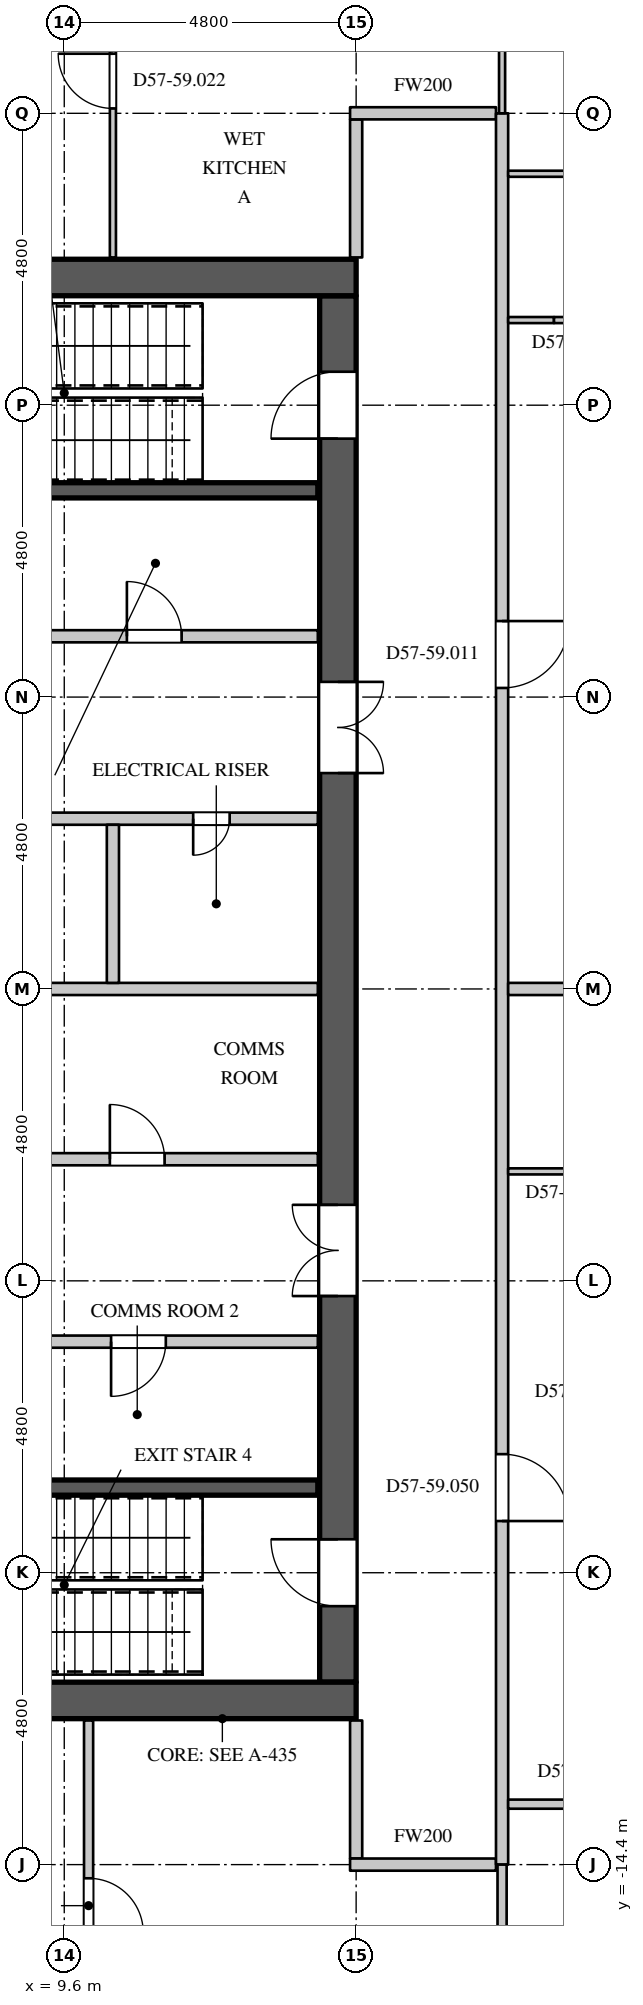
"""IFC4 building model, lengths in metres.
Left out: names, types, materials, properties, quantities, classifications, styles, units other than length and angle.
Written with IfcOpenShell. Run it as: python <this file> out.ifc"""

import sys

from ifc_helpers import new_model, si_unit, direction, frame, frame_2d, origin, place, context, subcontext, project, spatial, rectangle, extrude, element, fill, save


model = new_model("IFC4")
c1 = context("Model", 3, precision=1e-05, world=origin(), true_north=direction((0.0, 1.0)))
c2 = subcontext(c1, "Body", "Model", "MODEL_VIEW")
j1 = project(units=[si_unit("LENGTHUNIT", "METRE"), si_unit("PLANEANGLEUNIT", "RADIAN")], contexts=[c1])
p1 = place(None, origin())
s1 = spatial("IfcSite", under=j1, at=p1, CompositionType="ELEMENT")
p2 = place(p1, origin())
s2 = spatial("IfcBuilding", under=s1, at=p2, CompositionType="ELEMENT")
p3 = place(p2, frame((0.0, 0.0, 247.5)))
s3 = spatial("IfcBuildingStorey", under=s2, at=p3, CompositionType="ELEMENT", Elevation=247.5)
for number, where, z_axis, x_axis in (
    (1, (-14.4, 11.7, 0.0), (0.0, 0.0, 1.0), (1.0, 0.0, 0.0)),
    (2, (-14.4, -11.7, 0.0), (0.0, 0.0, 1.0), (1.0, 0.0, 0.0)),
):
    element("IfcWall", number, at=place(p3, frame(where, z_axis=z_axis, x_axis=x_axis)), inside=s3, PredefinedType="SHEAR", context=c2, shape_type="SweptSolid", body=[
        extrude(rectangle(XDim=28.8, YDim=0.6, at=frame_2d((14.4, 0.0))), origin(), (0.0, 0.0, 1.0), 4.2),
    ])
p4 = place(p3, frame((14.1, -11.4, 0.0), z_axis=(0.0, 0.0, 1.0), x_axis=(0.0, 1.0, 0.0)))
e3 = element("IfcWall", 3, at=p4, inside=s3, PredefinedType="SHEAR", context=c2, shape_type="SweptSolid", body=[
    extrude(rectangle(XDim=22.8, YDim=0.6, at=frame_2d((11.4, 0.0))), origin(), (0.0, 0.0, 1.0), 4.2),
])
p5 = place(p4, frame((20.45, 0.0, 0.0)))
e4 = element("IfcOpeningElement", 4, at=p5, cuts=e3, PredefinedType="OPENING", context=c2, shape_type="SweptSolid", body=[
    extrude(rectangle(XDim=1.1, YDim=2.2, at=frame_2d((0.55, 1.1))), frame((0.0, 0.31, 0.0), z_axis=(0.0, -1.0, 0.0), x_axis=(1.0, 0.0, 0.0)), (0.0, 0.0, 1.0), 0.62),
])
p6 = place(p4, frame((1.25, 0.0, 0.0)))
e5 = element("IfcOpeningElement", 5, at=p6, cuts=e3, PredefinedType="OPENING", context=c2, shape_type="SweptSolid", body=[
    extrude(rectangle(XDim=1.1, YDim=2.2, at=frame_2d((0.55, 1.1))), frame((0.0, 0.31, 0.0), z_axis=(0.0, -1.0, 0.0), x_axis=(1.0, 0.0, 0.0)), (0.0, 0.0, 1.0), 0.62),
])
p7 = place(p4, frame((14.95, 0.0, 0.0)))
e6 = element("IfcOpeningElement", 6, at=p7, cuts=e3, PredefinedType="OPENING", context=c2, shape_type="SweptSolid", body=[
    extrude(rectangle(XDim=1.5, YDim=2.4, at=frame_2d((0.75, 1.2))), frame((0.0, 0.31, 0.0), z_axis=(0.0, -1.0, 0.0), x_axis=(1.0, 0.0, 0.0)), (0.0, 0.0, 1.0), 0.62),
])
p8 = place(p4, frame((6.35, 0.0, 0.0)))
e7 = element("IfcOpeningElement", 7, at=p8, cuts=e3, PredefinedType="OPENING", context=c2, shape_type="SweptSolid", body=[
    extrude(rectangle(XDim=1.5, YDim=2.4, at=frame_2d((0.75, 1.2))), frame((0.0, 0.31, 0.0), z_axis=(0.0, -1.0, 0.0), x_axis=(1.0, 0.0, 0.0)), (0.0, 0.0, 1.0), 0.62),
])
p9 = place(p3, frame((8.38, 5.8, 0.0), z_axis=(0.0, 0.0, 1.0), x_axis=(1.0, 0.0, 0.0)))
e8 = element("IfcWall", 8, at=p9, inside=s3, PredefinedType="PARTITIONING", context=c2, shape_type="SweptSolid", body=[
    extrude(rectangle(XDim=5.39, YDim=0.2, at=frame_2d((2.695, 0.0))), origin(), (0.0, 0.0, 1.0), 3.95),
])
p10 = place(p9, frame((2.25, 0.0, 0.0)))
e9 = element("IfcOpeningElement", 9, at=p10, cuts=e8, PredefinedType="OPENING", context=c2, shape_type="SweptSolid", body=[
    extrude(rectangle(XDim=0.9, YDim=2.2, at=frame_2d((0.45, 1.1))), frame((0.0, 0.11, 0.0), z_axis=(0.0, -1.0, 0.0), x_axis=(1.0, 0.0, 0.0)), (0.0, 0.0, 1.0), 0.22),
])
p11 = place(p3, frame((14.4, -14.3, 0.0), z_axis=(0.0, 0.0, 1.0), x_axis=(0.0, 1.0, 0.0)))
e10 = element("IfcWall", 10, at=p11, inside=s3, PredefinedType="PARTITIONING", context=c2, shape_type="SweptSolid", body=[
    extrude(rectangle(XDim=2.27, YDim=0.2, at=frame_2d((1.135, 0.0))), origin(), (0.0, 0.0, 1.0), 3.95),
])
p12 = place(p3, frame((14.3, -14.4, 0.0), z_axis=(0.0, 0.0, 1.0), x_axis=(1.0, 0.0, 0.0)))
e11 = element("IfcWall", 11, at=p12, inside=s3, PredefinedType="PARTITIONING", context=c2, shape_type="SweptSolid", body=[
    extrude(rectangle(XDim=2.4, YDim=0.2, at=frame_2d((1.2, 0.0))), origin(), (0.0, 0.0, 1.0), 3.95),
])
p13 = place(p3, frame((14.4, 12.03, 0.0), z_axis=(0.0, 0.0, 1.0), x_axis=(0.0, 1.0, 0.0)))
e12 = element("IfcWall", 12, at=p13, inside=s3, PredefinedType="PARTITIONING", context=c2, shape_type="SweptSolid", body=[
    extrude(rectangle(XDim=2.27, YDim=0.2, at=frame_2d((1.135, 0.0))), origin(), (0.0, 0.0, 1.0), 3.95),
])
p14 = place(p3, frame((14.3, 14.4, 0.0), z_axis=(0.0, 0.0, 1.0), x_axis=(1.0, 0.0, 0.0)))
e13 = element("IfcWall", 13, at=p14, inside=s3, PredefinedType="PARTITIONING", context=c2, shape_type="SweptSolid", body=[
    extrude(rectangle(XDim=2.4, YDim=0.2, at=frame_2d((1.2, 0.0))), origin(), (0.0, 0.0, 1.0), 3.95),
])
p15 = place(p3, frame((16.8, -14.4, 0.0), z_axis=(0.0, 0.0, 1.0), x_axis=(0.0, 1.0, 0.0)))
e14 = element("IfcWall", 14, at=p15, inside=s3, PredefinedType="PARTITIONING", context=c2, shape_type="SweptSolid", body=[
    extrude(rectangle(XDim=28.8, YDim=0.2, at=frame_2d((14.4, 0.0))), origin(), (0.0, 0.0, 1.0), 3.95),
])
p16 = place(p15, frame((19.35, 0.0, 0.0)))
e15 = element("IfcOpeningElement", 15, at=p16, cuts=e14, PredefinedType="OPENING", context=c2, shape_type="SweptSolid", body=[
    extrude(rectangle(XDim=1.1, YDim=2.4, at=frame_2d((0.55, 1.2))), frame((0.0, 0.11, 0.0), z_axis=(0.0, -1.0, 0.0), x_axis=(1.0, 0.0, 0.0)), (0.0, 0.0, 1.0), 0.22),
])
p17 = place(p15, frame((5.65, 0.0, 0.0)))
e16 = element("IfcOpeningElement", 16, at=p17, cuts=e14, PredefinedType="OPENING", context=c2, shape_type="SweptSolid", body=[
    extrude(rectangle(XDim=1.1, YDim=2.4, at=frame_2d((0.55, 1.2))), frame((0.0, 0.11, 0.0), z_axis=(0.0, -1.0, 0.0), x_axis=(1.0, 0.0, 0.0)), (0.0, 0.0, 1.0), 0.22),
])
p18 = place(p3, frame((10.0, -18.075, 0.0), z_axis=(0.0, 0.0, 1.0), x_axis=(0.0, 1.0, 0.0)))
e17 = element("IfcWall", 17, at=p18, inside=s3, PredefinedType="PARTITIONING", context=c2, shape_type="SweptSolid", body=[
    extrude(rectangle(XDim=6.045, YDim=0.15, at=frame_2d((3.022, 0.0))), origin(), (0.0, 0.0, 1.0), 3.95),
])
p19 = place(p18, frame((2.55, 0.0, 0.0)))
e18 = element("IfcOpeningElement", 18, at=p19, cuts=e17, PredefinedType="OPENING", context=c2, shape_type="SweptSolid", body=[
    extrude(rectangle(XDim=0.9, YDim=2.2, at=frame_2d((0.45, 1.1))), frame((0.0, 0.085, 0.0), z_axis=(0.0, -1.0, 0.0), x_axis=(1.0, 0.0, 0.0)), (0.0, 0.0, 1.0), 0.17),
])
p20 = place(p3, frame((16.8, -19.828, 0.0), z_axis=(0.0, 0.0, 1.0), x_axis=(0.0, 1.0, 0.0)))
e19 = element("IfcWall", 19, at=p20, inside=s3, PredefinedType="PARTITIONING", context=c2, shape_type="SweptSolid", body=[
    extrude(rectangle(XDim=5.428, YDim=0.15, at=frame_2d((2.714, 0.0))), origin(), (0.0, 0.0, 1.0), 3.95),
])
p21 = place(p20, frame((0.4, 0.0, 0.0)))
e20 = element("IfcOpeningElement", 20, at=p21, cuts=e19, PredefinedType="OPENING", context=c2, shape_type="SweptSolid", body=[
    extrude(rectangle(XDim=0.95, YDim=2.2, at=frame_2d((0.475, 1.1))), frame((0.0, 0.085, 0.0), z_axis=(0.0, -1.0, 0.0), x_axis=(1.0, 0.0, 0.0)), (0.0, 0.0, 1.0), 0.17),
])
p22 = place(p3, frame((16.9, -13.406, 0.0), z_axis=(0.0, 0.0, 1.0), x_axis=(1.0, 0.0, 0.0)))
e21 = element("IfcWall", 21, at=p22, inside=s3, PredefinedType="PARTITIONING", context=c2, shape_type="SweptSolid", body=[
    extrude(rectangle(XDim=8.324, YDim=0.15, at=frame_2d((4.162, 0.0))), origin(), (0.0, 0.0, 1.0), 3.95),
])
p23 = place(p22, frame((1.3, 0.0, 0.0)))
e22 = element("IfcOpeningElement", 22, at=p23, cuts=e21, PredefinedType="OPENING", context=c2, shape_type="SweptSolid", body=[
    extrude(rectangle(XDim=0.95, YDim=2.2, at=frame_2d((0.475, 1.1))), frame((0.0, 0.085, 0.0), z_axis=(0.0, -1.0, 0.0), x_axis=(1.0, 0.0, 0.0)), (0.0, 0.0, 1.0), 0.17),
])
p24 = place(p3, frame((16.9, 0.0, 0.0), z_axis=(0.0, 0.0, 1.0), x_axis=(1.0, 0.0, 0.0)))
e23 = element("IfcWall", 23, at=p24, inside=s3, PredefinedType="PARTITIONING", context=c2, shape_type="SweptSolid", body=[
    extrude(rectangle(XDim=9.555, YDim=0.2, at=frame_2d((4.778, 0.0))), origin(), (0.0, 0.0, 1.0), 3.95),
])
p25 = place(p3, frame((3.62, 2.8, 0.0), z_axis=(0.0, 0.0, 1.0), x_axis=(1.0, 0.0, 0.0)))
e24 = element("IfcWall", 24, at=p25, inside=s3, PredefinedType="PARTITIONING", context=c2, shape_type="SweptSolid", body=[
    extrude(rectangle(XDim=10.15, YDim=0.2, at=frame_2d((5.075, 0.0))), origin(), (0.0, 0.0, 1.0), 3.95),
])
p26 = place(p25, frame((8.1, 0.0, 0.0)))
e25 = element("IfcOpeningElement", 25, at=p26, cuts=e24, PredefinedType="OPENING", context=c2, shape_type="SweptSolid", body=[
    extrude(rectangle(XDim=0.6, YDim=2.0, at=frame_2d((0.3, 1.0))), frame((0.0, 0.11, 0.0), z_axis=(0.0, -1.0, 0.0), x_axis=(1.0, 0.0, 0.0)), (0.0, 0.0, 1.0), 0.22),
])
p27 = place(p25, frame((3.0, 0.0, 0.0)))
e26 = element("IfcOpeningElement", 26, at=p27, cuts=e24, PredefinedType="OPENING", context=c2, shape_type="SweptSolid", body=[
    extrude(rectangle(XDim=0.9, YDim=2.2, at=frame_2d((0.45, 1.1))), frame((0.0, 0.11, 0.0), z_axis=(0.0, -1.0, 0.0), x_axis=(1.0, 0.0, 0.0)), (0.0, 0.0, 1.0), 0.22),
])
p28 = place(p3, frame((7.82, -5.8, 0.0), z_axis=(0.0, 0.0, 1.0), x_axis=(1.0, 0.0, 0.0)))
e27 = element("IfcWall", 27, at=p28, inside=s3, PredefinedType="PARTITIONING", context=c2, shape_type="SweptSolid", body=[
    extrude(rectangle(XDim=5.95, YDim=0.2, at=frame_2d((2.975, 0.0))), origin(), (0.0, 0.0, 1.0), 3.95),
])
p29 = place(p28, frame((2.55, 0.0, 0.0)))
e28 = element("IfcOpeningElement", 28, at=p29, cuts=e27, PredefinedType="OPENING", context=c2, shape_type="SweptSolid", body=[
    extrude(rectangle(XDim=0.9, YDim=2.2, at=frame_2d((0.45, 1.1))), frame((0.0, 0.11, 0.0), z_axis=(0.0, -1.0, 0.0), x_axis=(1.0, 0.0, 0.0)), (0.0, 0.0, 1.0), 0.22),
])
p30 = place(p3, frame((7.8, -2.8, 0.0), z_axis=(0.0, 0.0, 1.0), x_axis=(1.0, 0.0, 0.0)))
e29 = element("IfcWall", 29, at=p30, inside=s3, PredefinedType="PARTITIONING", context=c2, shape_type="SweptSolid", body=[
    extrude(rectangle(XDim=5.97, YDim=0.2, at=frame_2d((2.985, 0.0))), origin(), (0.0, 0.0, 1.0), 3.95),
])
p31 = place(p30, frame((2.55, 0.0, 0.0)))
e30 = element("IfcOpeningElement", 30, at=p31, cuts=e29, PredefinedType="OPENING", context=c2, shape_type="SweptSolid", body=[
    extrude(rectangle(XDim=0.9, YDim=2.2, at=frame_2d((0.45, 1.1))), frame((0.0, 0.11, 0.0), z_axis=(0.0, -1.0, 0.0), x_axis=(1.0, 0.0, 0.0)), (0.0, 0.0, 1.0), 0.22),
])
p32 = place(p3, frame((7.8, 0.0, 0.0), z_axis=(0.0, 0.0, 1.0), x_axis=(1.0, 0.0, 0.0)))
e31 = element("IfcWall", 31, at=p32, inside=s3, PredefinedType="PARTITIONING", context=c2, shape_type="SweptSolid", body=[
    extrude(rectangle(XDim=5.97, YDim=0.2, at=frame_2d((2.985, 0.0))), origin(), (0.0, 0.0, 1.0), 3.95),
])
p33 = place(p3, frame((10.4, 0.1, 0.0), z_axis=(0.0, 0.0, 1.0), x_axis=(0.0, 1.0, 0.0)))
e32 = element("IfcWall", 32, at=p33, inside=s3, PredefinedType="PARTITIONING", context=c2, shape_type="SweptSolid", body=[
    extrude(rectangle(XDim=2.6, YDim=0.2, at=frame_2d((1.3, 0.0))), origin(), (0.0, 0.0, 1.0), 3.95),
])
for number, where, z_axis, x_axis in (
    (33, (5.275, -8.2, 0.0), (0.0, 0.0, 1.0), (1.0, 0.0, 0.0)),
    (34, (5.275, 8.2, 0.0), (0.0, 0.0, 1.0), (1.0, 0.0, 0.0)),
):
    element("IfcWall", number, at=place(p3, frame(where, z_axis=z_axis, x_axis=x_axis)), inside=s3, PredefinedType="SHEAR", context=c2, shape_type="SweptSolid", body=[
        extrude(rectangle(XDim=8.495, YDim=0.25, at=frame_2d((4.248, 0.0))), origin(), (0.0, 0.0, 1.0), 3.95),
    ])
p34 = place(p3, frame((10.4, 12.03, 0.0), z_axis=(0.0, 0.0, 1.0), x_axis=(0.0, 1.0, 0.0)))
e35 = element("IfcWall", 35, at=p34, inside=s3, PredefinedType="PARTITIONING", context=c2, shape_type="SweptSolid", body=[
    extrude(rectangle(XDim=5.795, YDim=0.1, at=frame_2d((2.897, 0.0))), origin(), (0.0, 0.0, 1.0), 3.95),
])
p35 = place(p34, frame((2.45, 0.0, 0.0)))
e36 = element("IfcOpeningElement", 36, at=p35, cuts=e35, PredefinedType="OPENING", context=c2, shape_type="SweptSolid", body=[
    extrude(rectangle(XDim=0.9, YDim=2.2, at=frame_2d((0.45, 1.1))), frame((0.0, 0.06, 0.0), z_axis=(0.0, -1.0, 0.0), x_axis=(1.0, 0.0, 0.0)), (0.0, 0.0, 1.0), 0.12),
])
p36 = place(p3, frame((16.9, -3.0, 0.0), z_axis=(0.0, 0.0, 1.0), x_axis=(1.0, 0.0, 0.0)))
e37 = element("IfcWall", 37, at=p36, inside=s3, PredefinedType="PARTITIONING", context=c2, shape_type="SweptSolid", body=[
    extrude(rectangle(XDim=2.875, YDim=0.1, at=frame_2d((1.438, 0.0))), origin(), (0.0, 0.0, 1.0), 3.95),
])
p37 = place(p36, frame((0.95, 0.0, 0.0)))
e38 = element("IfcOpeningElement", 38, at=p37, cuts=e37, PredefinedType="OPENING", context=c2, shape_type="SweptSolid", body=[
    extrude(rectangle(XDim=0.9, YDim=2.2, at=frame_2d((0.45, 1.1))), frame((0.0, 0.06, 0.0), z_axis=(0.0, -1.0, 0.0), x_axis=(1.0, 0.0, 0.0)), (0.0, 0.0, 1.0), 0.12),
])
p38 = place(p3, frame((16.9, 11.0, 0.0), z_axis=(0.0, 0.0, 1.0), x_axis=(1.0, 0.0, 0.0)))
e39 = element("IfcWall", 39, at=p38, inside=s3, PredefinedType="PARTITIONING", context=c2, shape_type="SweptSolid", body=[
    extrude(rectangle(XDim=0.754, YDim=0.1, at=frame_2d((0.377, 0.0))), origin(), (0.0, 0.0, 1.0), 3.35),
])
p39 = place(p3, frame((17.654, 11.0, 0.0), z_axis=(0.0, 0.0, 1.0), x_axis=(1.0, 0.0, 0.0)))
e40 = element("IfcWall", 40, at=p39, inside=s3, PredefinedType="PARTITIONING", context=c2, shape_type="SweptSolid", body=[
    extrude(rectangle(XDim=2.921, YDim=0.1, at=frame_2d((1.46, 0.0))), origin(), (0.0, 0.0, 1.0), 3.95),
])
p40 = place(p39, frame((0.596, 0.0, 0.0)))
e41 = element("IfcOpeningElement", 41, at=p40, cuts=e40, PredefinedType="OPENING", context=c2, shape_type="SweptSolid", body=[
    extrude(rectangle(XDim=0.9, YDim=2.2, at=frame_2d((0.45, 1.1))), frame((0.0, 0.06, 0.0), z_axis=(0.0, -1.0, 0.0), x_axis=(1.0, 0.0, 0.0)), (0.0, 0.0, 1.0), 0.12),
])
p41 = place(p3, frame((16.9, 13.406, 0.0), z_axis=(0.0, 0.0, 1.0), x_axis=(1.0, 0.0, 0.0)))
e42 = element("IfcWall", 42, at=p41, inside=s3, PredefinedType="PARTITIONING", context=c2, shape_type="SweptSolid", body=[
    extrude(rectangle(XDim=3.75, YDim=0.1, at=frame_2d((1.875, 0.0))), origin(), (0.0, 0.0, 1.0), 3.95),
])
p42 = place(p3, frame((16.8, 14.4, 0.0), z_axis=(0.0, 0.0, 1.0), x_axis=(0.0, 1.0, 0.0)))
e43 = element("IfcWall", 43, at=p42, inside=s3, PredefinedType="PARTITIONING", context=c2, shape_type="SweptSolid", body=[
    extrude(rectangle(XDim=3.5, YDim=0.1, at=frame_2d((1.75, 0.0))), origin(), (0.0, 0.0, 1.0), 3.95),
])
p43 = place(p26, origin())
e44 = element("IfcDoor", 44, at=p43, inside=s3, OperationType="SINGLE_SWING_RIGHT", PredefinedType="DOOR", context=c2, shape_type="SweptSolid", body=[
    extrude(rectangle(XDim=0.6, YDim=2.0, at=frame_2d((0.3, 1.0))), frame((0.0, 0.025, 0.0), z_axis=(0.0, -1.0, 0.0), x_axis=(1.0, 0.0, 0.0)), (0.0, 0.0, 1.0), 0.05),
])
fill(e25, e44)
p44 = place(p31, origin())
e45 = element("IfcDoor", 45, at=p44, inside=s3, OperationType="SINGLE_SWING_LEFT", PredefinedType="DOOR", context=c2, shape_type="SweptSolid", body=[
    extrude(rectangle(XDim=0.9, YDim=2.2, at=frame_2d((0.45, 1.1))), frame((0.0, 0.025, 0.0), z_axis=(0.0, -1.0, 0.0), x_axis=(1.0, 0.0, 0.0)), (0.0, 0.0, 1.0), 0.05),
])
fill(e30, e45)
p45 = place(p10, origin())
e46 = element("IfcDoor", 46, at=p45, inside=s3, OperationType="SINGLE_SWING_LEFT", PredefinedType="DOOR", context=c2, shape_type="SweptSolid", body=[
    extrude(rectangle(XDim=0.9, YDim=2.2, at=frame_2d((0.45, 1.1))), frame((0.0, 0.025, 0.0), z_axis=(0.0, -1.0, 0.0), x_axis=(1.0, 0.0, 0.0)), (0.0, 0.0, 1.0), 0.05),
])
fill(e9, e46)
p46 = place(p29, origin())
e47 = element("IfcDoor", 47, at=p46, inside=s3, OperationType="SINGLE_SWING_RIGHT", PredefinedType="DOOR", context=c2, shape_type="SweptSolid", body=[
    extrude(rectangle(XDim=0.9, YDim=2.2, at=frame_2d((0.45, 1.1))), frame((0.0, 0.025, 0.0), z_axis=(0.0, -1.0, 0.0), x_axis=(1.0, 0.0, 0.0)), (0.0, 0.0, 1.0), 0.05),
])
fill(e28, e47)
p47 = place(p5, origin())
e48 = element("IfcDoor", 48, at=p47, inside=s3, OperationType="SINGLE_SWING_LEFT", PredefinedType="DOOR", context=c2, shape_type="SweptSolid", body=[
    extrude(rectangle(XDim=1.1, YDim=2.2, at=frame_2d((0.55, 1.1))), frame((0.0, 0.295, 0.0), z_axis=(0.0, -1.0, 0.0), x_axis=(1.0, 0.0, 0.0)), (0.0, 0.0, 1.0), 0.05),
])
fill(e4, e48)
p48 = place(p6, origin())
e49 = element("IfcDoor", 49, at=p48, inside=s3, OperationType="SINGLE_SWING_RIGHT", PredefinedType="DOOR", context=c2, shape_type="SweptSolid", body=[
    extrude(rectangle(XDim=1.1, YDim=2.2, at=frame_2d((0.55, 1.1))), frame((0.0, 0.295, 0.0), z_axis=(0.0, -1.0, 0.0), x_axis=(1.0, 0.0, 0.0)), (0.0, 0.0, 1.0), 0.05),
])
fill(e5, e49)
p49 = place(p7, origin())
e50 = element("IfcDoor", 50, at=p49, inside=s3, OperationType="DOUBLE_DOOR_SINGLE_SWING", PredefinedType="DOOR", context=c2, shape_type="SweptSolid", body=[
    extrude(rectangle(XDim=1.5, YDim=2.4, at=frame_2d((0.75, 1.2))), frame((0.0, -0.245, 0.0), z_axis=(0.0, -1.0, 0.0), x_axis=(1.0, 0.0, 0.0)), (0.0, 0.0, 1.0), 0.05),
])
fill(e6, e50)
p50 = place(p8, origin())
e51 = element("IfcDoor", 51, at=p50, inside=s3, OperationType="DOUBLE_DOOR_SINGLE_SWING", PredefinedType="DOOR", context=c2, shape_type="SweptSolid", body=[
    extrude(rectangle(XDim=1.5, YDim=2.4, at=frame_2d((0.75, 1.2))), frame((0.0, 0.295, 0.0), z_axis=(0.0, -1.0, 0.0), x_axis=(1.0, 0.0, 0.0)), (0.0, 0.0, 1.0), 0.05),
])
fill(e7, e51)
p51 = place(p16, origin())
e52 = element("IfcDoor", 52, at=p51, inside=s3, OperationType="SINGLE_SWING_LEFT", PredefinedType="DOOR", context=c2, shape_type="SweptSolid", body=[
    extrude(rectangle(XDim=1.1, YDim=2.4, at=frame_2d((0.55, 1.2))), frame((0.0, 0.025, 0.0), z_axis=(0.0, -1.0, 0.0), x_axis=(1.0, 0.0, 0.0)), (0.0, 0.0, 1.0), 0.05),
])
fill(e15, e52)
p52 = place(p35, origin())
e53 = element("IfcDoor", 53, at=p52, inside=s3, OperationType="SINGLE_SWING_RIGHT", PredefinedType="DOOR", context=c2, shape_type="SweptSolid", body=[
    extrude(rectangle(XDim=0.9, YDim=2.2, at=frame_2d((0.45, 1.1))), frame((0.0, 0.025, 0.0), z_axis=(0.0, -1.0, 0.0), x_axis=(1.0, 0.0, 0.0)), (0.0, 0.0, 1.0), 0.05),
])
fill(e36, e53)
p53 = place(p17, origin())
e54 = element("IfcDoor", 54, at=p53, inside=s3, OperationType="SINGLE_SWING_RIGHT", PredefinedType="DOOR", context=c2, shape_type="SweptSolid", body=[
    extrude(rectangle(XDim=1.1, YDim=2.4, at=frame_2d((0.55, 1.2))), frame((0.0, 0.025, 0.0), z_axis=(0.0, -1.0, 0.0), x_axis=(1.0, 0.0, 0.0)), (0.0, 0.0, 1.0), 0.05),
])
fill(e16, e54)
p54 = place(p19, origin())
e55 = element("IfcDoor", 55, at=p54, inside=s3, OperationType="SINGLE_SWING_RIGHT", PredefinedType="DOOR", context=c2, shape_type="SweptSolid", body=[
    extrude(rectangle(XDim=0.9, YDim=2.2, at=frame_2d((0.45, 1.1))), frame((0.0, 0.025, 0.0), z_axis=(0.0, -1.0, 0.0), x_axis=(1.0, 0.0, 0.0)), (0.0, 0.0, 1.0), 0.05),
])
fill(e18, e55)
save(model, sys.argv[1])
